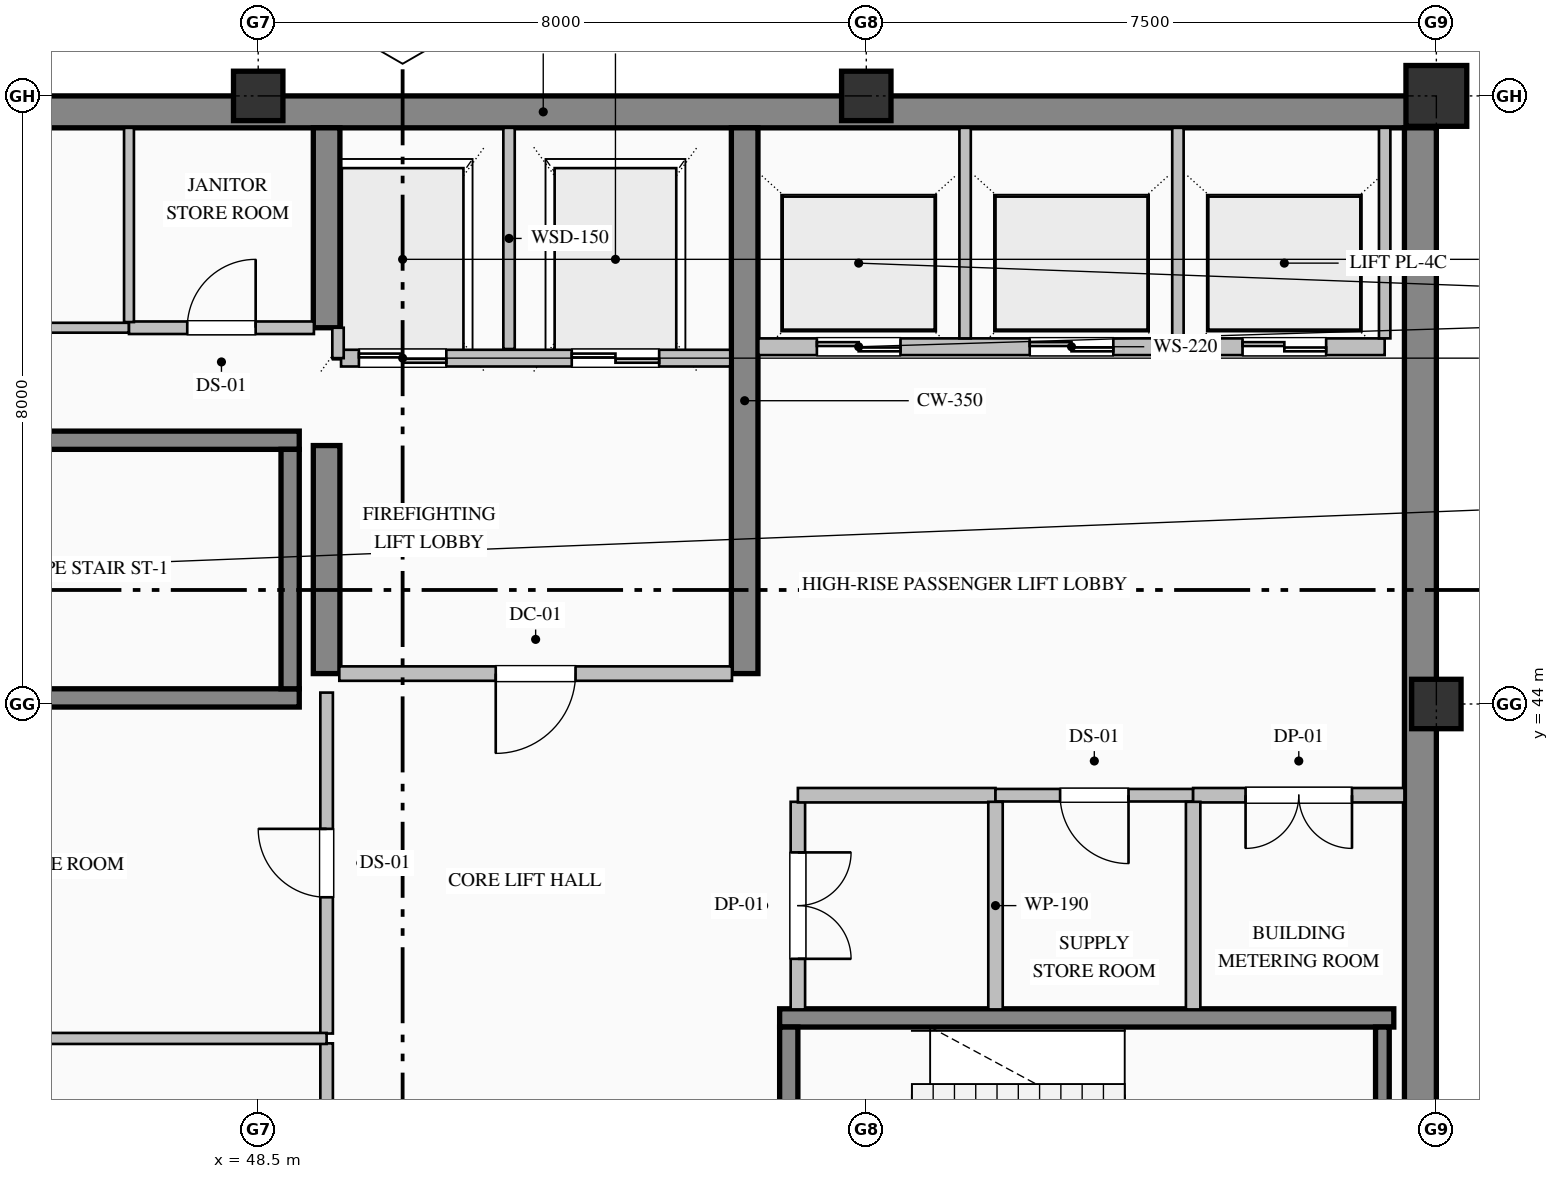
"""IFC4 building model, lengths in metres.
Left out: names, types, materials, properties, quantities, classifications, styles, units other than length and angle.
Written with IfcOpenShell. Run it as: python <this file> out.ifc"""

import sys

from ifc_helpers import new_model, si_unit, direction, frame, frame_2d, origin, origin_2d, place, context, subcontext, project, spatial, rectangle, hollow_rectangle, extrude, element, fill, save


model = new_model("IFC4")
c1 = context("Model", 3, precision=1e-05, world=origin(), true_north=direction((0.0, 1.0)))
c2 = subcontext(c1, "Body", "Model", "MODEL_VIEW")
j1 = project(units=[si_unit("LENGTHUNIT", "METRE"), si_unit("PLANEANGLEUNIT", "RADIAN")], contexts=[c1])
p1 = place(None, origin())
s1 = spatial("IfcSite", under=j1, at=p1, CompositionType="ELEMENT")
p2 = place(p1, origin())
s2 = spatial("IfcBuilding", under=s1, at=p2, CompositionType="ELEMENT")
p3 = place(p2, frame((0.0, 0.0, 355.2)))
s3 = spatial("IfcBuildingStorey", under=s2, at=p3, CompositionType="ELEMENT", Elevation=355.2)
p4 = place(p3, frame((40.5, 51.79, 0.0), z_axis=(0.0, 0.0, 1.0), x_axis=(1.0, 0.0, 0.0)))
e1 = element("IfcWall", 1, at=p4, inside=s3, PredefinedType="SHEAR", context=c2, shape_type="SweptSolid", body=[
    extrude(rectangle(XDim=23.5, YDim=0.42, at=frame_2d((11.75, 0.0))), origin(), (0.0, 0.0, 1.0), 3.785),
])
p5 = place(p3, frame((63.79, 36.32, 0.0), z_axis=(0.0, 0.0, 1.0), x_axis=(0.0, 1.0, 0.0)))
e2 = element("IfcWall", 2, at=p5, inside=s3, PredefinedType="SHEAR", context=c2, shape_type="SweptSolid", body=[
    extrude(rectangle(XDim=15.26, YDim=0.42, at=frame_2d((7.63, 0.0))), origin(), (0.0, 0.0, 1.0), 3.785),
])
p6 = place(p3, frame((49.4, 44.4, 0.0), z_axis=(0.0, 0.0, 1.0), x_axis=(0.0, 1.0, 0.0)))
e3 = element("IfcWall", 3, at=p6, inside=s3, PredefinedType="SHEAR", context=c2, shape_type="SweptSolid", body=[
    extrude(rectangle(XDim=3.0, YDim=0.35, at=frame_2d((1.5, 0.0))), origin(), (0.0, 0.0, 1.0), 3.785),
])
p7 = place(p3, frame((49.4, 48.95, 0.0), z_axis=(0.0, 0.0, 1.0), x_axis=(0.0, 1.0, 0.0)))
e4 = element("IfcWall", 4, at=p7, inside=s3, PredefinedType="SHEAR", context=c2, shape_type="SweptSolid", body=[
    extrude(rectangle(XDim=2.63, YDim=0.35, at=frame_2d((1.315, 0.0))), origin(), (0.0, 0.0, 1.0), 3.785),
])
p8 = place(p3, frame((54.9, 44.4, 0.0), z_axis=(0.0, 0.0, 1.0), x_axis=(0.0, 1.0, 0.0)))
e5 = element("IfcWall", 5, at=p8, inside=s3, PredefinedType="SHEAR", context=c2, shape_type="SweptSolid", body=[
    extrude(rectangle(XDim=7.18, YDim=0.35, at=frame_2d((3.59, 0.0))), origin(), (0.0, 0.0, 1.0), 3.785),
])
for number, where, z_axis, x_axis in (
    (6, (48.5, 52.0, 0.0), (0.0, 0.0, 1.0), (1.0, 0.0, 0.0)),
    (7, (56.5, 52.0, 0.0), (0.0, 0.0, 1.0), (1.0, 0.0, 0.0)),
    (8, (64.0, 44.0, 0.0), (0.0, 0.0, 1.0), (1.0, 0.0, 0.0)),
):
    element("IfcColumn", number, at=place(p3, frame(where, z_axis=z_axis, x_axis=x_axis)), inside=s3, PredefinedType="COLUMN", context=c2, shape_type="SweptSolid", body=[
        extrude(hollow_rectangle(XDim=0.65, YDim=0.65, WallThickness=0.028, at=origin_2d()), origin(), (0.0, 0.0, 1.0), 4.0),
    ])
p9 = place(p3, frame((64.0, 52.0, 0.0), z_axis=(0.0, 0.0, 1.0), x_axis=(1.0, 0.0, 0.0)))
e9 = element("IfcColumn", 9, at=p9, inside=s3, PredefinedType="COLUMN", context=c2, shape_type="SweptSolid", body=[
    extrude(hollow_rectangle(XDim=0.8, YDim=0.8, WallThickness=0.032, at=origin_2d()), origin(), (0.0, 0.0, 1.0), 4.0),
])
for number, where, z_axis, x_axis in (
    (10, (40.96, 47.47, 0.0), (0.0, 0.0, 1.0), (1.0, 0.0, 0.0)),
    (11, (49.04, 44.08, 0.0), (0.0, 0.0, 1.0), (-1.0, 0.0, 0.0)),
):
    element("IfcWall", number, at=place(p3, frame(where, z_axis=z_axis, x_axis=x_axis)), inside=s3, PredefinedType="SOLIDWALL", context=c2, shape_type="SweptSolid", body=[
        extrude(rectangle(XDim=8.08, YDim=0.24, at=frame_2d((4.04, 0.0))), origin(), (0.0, 0.0, 1.0), 4.0),
    ])
p10 = place(p3, frame((48.92, 44.2, 0.0), z_axis=(0.0, 0.0, 1.0), x_axis=(0.0, 1.0, 0.0)))
e12 = element("IfcWall", 12, at=p10, inside=s3, PredefinedType="SOLIDWALL", context=c2, shape_type="SweptSolid", body=[
    extrude(rectangle(XDim=3.15, YDim=0.24, at=frame_2d((1.575, 0.0))), origin(), (0.0, 0.0, 1.0), 4.0),
])
p11 = place(p3, frame((55.36, 39.87, 0.0), z_axis=(0.0, 0.0, 1.0), x_axis=(1.0, 0.0, 0.0)))
e13 = element("IfcWall", 13, at=p11, inside=s3, PredefinedType="SOLIDWALL", context=c2, shape_type="SweptSolid", body=[
    extrude(rectangle(XDim=8.08, YDim=0.24, at=frame_2d((4.04, 0.0))), origin(), (0.0, 0.0, 1.0), 4.0),
])
p12 = place(p3, frame((55.48, 39.75, 0.0), z_axis=(0.0, 0.0, 1.0), x_axis=(0.0, -1.0, 0.0)))
e14 = element("IfcWall", 14, at=p12, inside=s3, PredefinedType="SOLIDWALL", context=c2, shape_type="SweptSolid", body=[
    extrude(rectangle(XDim=3.15, YDim=0.24, at=frame_2d((1.575, 0.0))), origin(), (0.0, 0.0, 1.0), 4.0),
])
p13 = place(p12, frame((1.0, 0.0, 0.0)))
e15 = element("IfcOpeningElement", 15, at=p13, cuts=e14, PredefinedType="OPENING", context=c2, shape_type="SweptSolid", body=[
    extrude(rectangle(XDim=1.15, YDim=2.2, at=frame_2d((0.575, 1.1))), frame((0.0, 0.13, 0.0), z_axis=(0.0, -1.0, 0.0), x_axis=(1.0, 0.0, 0.0)), (0.0, 0.0, 1.0), 0.26),
])
p14 = place(p3, frame((63.29, 36.6, 0.0), z_axis=(0.0, 0.0, 1.0), x_axis=(0.0, 1.0, 0.0)))
e16 = element("IfcWall", 16, at=p14, inside=s3, PredefinedType="SOLIDWALL", context=c2, shape_type="SweptSolid", body=[
    extrude(rectangle(XDim=3.15, YDim=0.18, at=frame_2d((1.575, 0.0))), origin(), (0.0, 0.0, 1.0), 4.0),
])
p15 = place(p3, frame((54.71, 48.55, 0.0), z_axis=(0.0, 0.0, 1.0), x_axis=(-1.0, 0.0, 0.0)))
e17 = element("IfcWall", 17, at=p15, inside=s3, PredefinedType="PARTITIONING", context=c2, shape_type="SweptSolid", body=[
    extrude(rectangle(XDim=5.12, YDim=0.22, at=frame_2d((2.56, 0.0))), origin(), (0.0, 0.0, 1.0), 3.785),
])
p16 = place(p15, frame((3.735, 0.0, 0.0)))
e18 = element("IfcOpeningElement", 18, at=p16, cuts=e17, PredefinedType="OPENING", context=c2, shape_type="SweptSolid", body=[
    extrude(rectangle(XDim=1.15, YDim=2.2, at=frame_2d((0.575, 1.1))), frame((0.0, 0.12, 0.0), z_axis=(0.0, -1.0, 0.0), x_axis=(1.0, 0.0, 0.0)), (0.0, 0.0, 1.0), 0.24),
])
p17 = place(p15, frame((0.935, 0.0, 0.0)))
e19 = element("IfcOpeningElement", 19, at=p17, cuts=e17, PredefinedType="OPENING", context=c2, shape_type="SweptSolid", body=[
    extrude(rectangle(XDim=1.15, YDim=2.2, at=frame_2d((0.575, 1.1))), frame((0.0, 0.12, 0.0), z_axis=(0.0, -1.0, 0.0), x_axis=(1.0, 0.0, 0.0)), (0.0, 0.0, 1.0), 0.24),
])
p18 = place(p3, frame((51.8, 48.67, 0.0), z_axis=(0.0, 0.0, 1.0), x_axis=(0.0, 1.0, 0.0)))
e20 = element("IfcWall", 20, at=p18, inside=s3, PredefinedType="PARTITIONING", context=c2, shape_type="SweptSolid", body=[
    extrude(rectangle(XDim=2.91, YDim=0.15, at=frame_2d((1.455, 0.0))), origin(), (0.0, 0.0, 1.0), 3.785),
])
p19 = place(p3, frame((49.55, 48.55, 0.0), z_axis=(0.0, 0.0, 1.0), x_axis=(0.0, 1.0, 0.0)))
e21 = element("IfcWall", 21, at=p19, inside=s3, PredefinedType="PARTITIONING", context=c2, shape_type="SweptSolid", body=[
    extrude(rectangle(XDim=0.4, YDim=0.15, at=frame_2d((0.2, 0.0))), origin(), (0.0, 0.0, 1.0), 3.785),
])
p20 = place(p3, frame((63.32, 48.7, 0.0), z_axis=(0.0, 0.0, 1.0), x_axis=(-1.0, 0.0, 0.0)))
e22 = element("IfcWall", 22, at=p20, inside=s3, PredefinedType="PARTITIONING", context=c2, shape_type="SweptSolid", body=[
    extrude(rectangle(XDim=8.24, YDim=0.22, at=frame_2d((4.12, 0.0))), origin(), (0.0, 0.0, 1.0), 3.785),
])
p21 = place(p20, frame((6.37, 0.0, 0.0)))
e23 = element("IfcOpeningElement", 23, at=p21, cuts=e22, PredefinedType="OPENING", context=c2, shape_type="SweptSolid", body=[
    extrude(rectangle(XDim=1.1, YDim=2.2, at=frame_2d((0.55, 1.1))), frame((0.0, 0.12, 0.0), z_axis=(0.0, -1.0, 0.0), x_axis=(1.0, 0.0, 0.0)), (0.0, 0.0, 1.0), 0.24),
])
p22 = place(p20, frame((3.57, 0.0, 0.0)))
e24 = element("IfcOpeningElement", 24, at=p22, cuts=e22, PredefinedType="OPENING", context=c2, shape_type="SweptSolid", body=[
    extrude(rectangle(XDim=1.1, YDim=2.2, at=frame_2d((0.55, 1.1))), frame((0.0, 0.12, 0.0), z_axis=(0.0, -1.0, 0.0), x_axis=(1.0, 0.0, 0.0)), (0.0, 0.0, 1.0), 0.24),
])
p23 = place(p20, frame((0.77, 0.0, 0.0)))
e25 = element("IfcOpeningElement", 25, at=p23, cuts=e22, PredefinedType="OPENING", context=c2, shape_type="SweptSolid", body=[
    extrude(rectangle(XDim=1.1, YDim=2.2, at=frame_2d((0.55, 1.1))), frame((0.0, 0.12, 0.0), z_axis=(0.0, -1.0, 0.0), x_axis=(1.0, 0.0, 0.0)), (0.0, 0.0, 1.0), 0.24),
])
for number, where, z_axis, x_axis in (
    (26, (57.8, 48.81, 0.0), (0.0, 0.0, 1.0), (0.0, 1.0, 0.0)),
    (27, (60.6, 48.81, 0.0), (0.0, 0.0, 1.0), (0.0, 1.0, 0.0)),
    (28, (63.32, 48.81, 0.0), (0.0, 0.0, 1.0), (0.0, 1.0, 0.0)),
):
    element("IfcWall", number, at=place(p3, frame(where, z_axis=z_axis, x_axis=x_axis)), inside=s3, PredefinedType="PARTITIONING", context=c2, shape_type="SweptSolid", body=[
        extrude(rectangle(XDim=2.77, YDim=0.15, at=frame_2d((1.385, 0.0))), origin(), (0.0, 0.0, 1.0), 3.785),
    ])
p24 = place(p3, frame((40.92, 48.95, 0.0), z_axis=(0.0, 0.0, 1.0), x_axis=(1.0, 0.0, 0.0)))
e29 = element("IfcWall", 29, at=p24, inside=s3, PredefinedType="PARTITIONING", context=c2, shape_type="SweptSolid", body=[
    extrude(rectangle(XDim=5.88, YDim=0.13, at=frame_2d((2.94, 0.0))), origin(), (0.0, 0.0, 1.0), 3.785),
])
p25 = place(p24, frame((2.48, 0.0, 0.0)))
e30 = element("IfcOpeningElement", 30, at=p25, cuts=e29, PredefinedType="OPENING", context=c2, shape_type="SweptSolid", body=[
    extrude(rectangle(XDim=0.92, YDim=2.15, at=frame_2d((0.46, 1.075))), frame((0.0, 0.075, 0.0), z_axis=(0.0, -1.0, 0.0), x_axis=(1.0, 0.0, 0.0)), (0.0, 0.0, 1.0), 0.15),
])
p26 = place(p3, frame((46.8, 48.95, 0.0), z_axis=(0.0, 0.0, 1.0), x_axis=(1.0, 0.0, 0.0)))
e31 = element("IfcWall", 31, at=p26, inside=s3, PredefinedType="PARTITIONING", context=c2, shape_type="SweptSolid", body=[
    extrude(rectangle(XDim=2.433, YDim=0.165, at=frame_2d((1.216, 0.0))), origin(), (0.0, 0.0, 1.0), 3.785),
])
p27 = place(p26, frame((0.767, 0.0, 0.0)))
e32 = element("IfcOpeningElement", 32, at=p27, cuts=e31, PredefinedType="OPENING", context=c2, shape_type="SweptSolid", body=[
    extrude(rectangle(XDim=0.9, YDim=2.15, at=frame_2d((0.45, 1.075))), frame((0.0, 0.093, 0.0), z_axis=(0.0, -1.0, 0.0), x_axis=(1.0, 0.0, 0.0)), (0.0, 0.0, 1.0), 0.185),
])
p28 = place(p3, frame((54.733, 44.4, 0.0), z_axis=(0.0, 0.0, 1.0), x_axis=(-1.0, 0.0, 0.0)))
e33 = element("IfcWall", 33, at=p28, inside=s3, PredefinedType="PARTITIONING", context=c2, shape_type="SweptSolid", body=[
    extrude(rectangle(XDim=5.166, YDim=0.19, at=frame_2d((2.583, 0.0))), origin(), (0.0, 0.0, 1.0), 3.785),
])
p29 = place(p28, frame((2.058, 0.0, 0.0)))
e34 = element("IfcOpeningElement", 34, at=p29, cuts=e33, PredefinedType="OPENING", context=c2, shape_type="SweptSolid", body=[
    extrude(rectangle(XDim=1.05, YDim=2.15, at=frame_2d((0.525, 1.075))), frame((0.0, 0.105, 0.0), z_axis=(0.0, -1.0, 0.0), x_axis=(1.0, 0.0, 0.0)), (0.0, 0.0, 1.0), 0.21),
])
p30 = place(p3, frame((49.4, 36.42, 0.0), z_axis=(0.0, 0.0, 1.0), x_axis=(0.0, 1.0, 0.0)))
e35 = element("IfcWall", 35, at=p30, inside=s3, PredefinedType="PARTITIONING", context=c2, shape_type="SweptSolid", body=[
    extrude(rectangle(XDim=3.115, YDim=0.165, at=frame_2d((1.558, 0.0))), origin(), (0.0, 0.0, 1.0), 3.027),
])
p31 = place(p30, frame((1.058, 0.0, 0.0)))
e36 = element("IfcOpeningElement", 36, at=p31, cuts=e35, PredefinedType="OPENING", context=c2, shape_type="SweptSolid", body=[
    extrude(rectangle(XDim=1.0, YDim=2.15, at=frame_2d((0.5, 1.075))), frame((0.0, 0.093, 0.0), z_axis=(0.0, -1.0, 0.0), x_axis=(1.0, 0.0, 0.0)), (0.0, 0.0, 1.0), 0.185),
])
p32 = place(p3, frame((49.4, 39.665, 0.0), z_axis=(0.0, 0.0, 1.0), x_axis=(0.0, 1.0, 0.0)))
e37 = element("IfcWall", 37, at=p32, inside=s3, PredefinedType="PARTITIONING", context=c2, shape_type="SweptSolid", body=[
    extrude(rectangle(XDim=4.485, YDim=0.165, at=frame_2d((2.243, 0.0))), origin(), (0.0, 0.0, 1.0), 3.027),
])
p33 = place(p32, frame((1.793, 0.0, 0.0)))
e38 = element("IfcOpeningElement", 38, at=p33, cuts=e37, PredefinedType="OPENING", context=c2, shape_type="SweptSolid", body=[
    extrude(rectangle(XDim=0.9, YDim=2.15, at=frame_2d((0.45, 1.075))), frame((0.0, 0.093, 0.0), z_axis=(0.0, -1.0, 0.0), x_axis=(1.0, 0.0, 0.0)), (0.0, 0.0, 1.0), 0.185),
])
p34 = place(p3, frame((55.6, 42.713, 0.0), z_axis=(0.0, 0.0, 1.0), x_axis=(0.0, -1.0, 0.0)))
e39 = element("IfcWall", 39, at=p34, inside=s3, PredefinedType="PARTITIONING", context=c2, shape_type="SweptSolid", body=[
    extrude(rectangle(XDim=2.731, YDim=0.19, at=frame_2d((1.365, 0.0))), origin(), (0.0, 0.0, 1.0), 3.785),
])
p35 = place(p34, frame((0.666, 0.0, 0.0)))
e40 = element("IfcOpeningElement", 40, at=p35, cuts=e39, PredefinedType="OPENING", context=c2, shape_type="SweptSolid", body=[
    extrude(rectangle(XDim=1.4, YDim=2.25, at=frame_2d((0.7, 1.125))), frame((0.0, 0.105, 0.0), z_axis=(0.0, -1.0, 0.0), x_axis=(1.0, 0.0, 0.0)), (0.0, 0.0, 1.0), 0.21),
])
p36 = place(p3, frame((40.92, 39.6, 0.0), z_axis=(0.0, 0.0, 1.0), x_axis=(1.0, 0.0, 0.0)))
e41 = element("IfcWall", 41, at=p36, inside=s3, PredefinedType="PARTITIONING", context=c2, shape_type="SweptSolid", body=[
    extrude(rectangle(XDim=8.48, YDim=0.145, at=frame_2d((4.24, 0.0))), origin(), (0.0, 0.0, 1.0), 3.785),
])
p37 = place(p3, frame((58.2, 42.8, 0.0), z_axis=(0.0, 0.0, 1.0), x_axis=(-1.0, 0.0, 0.0)))
e42 = element("IfcWall", 42, at=p37, inside=s3, PredefinedType="PARTITIONING", context=c2, shape_type="SweptSolid", body=[
    extrude(rectangle(XDim=2.6, YDim=0.19, at=frame_2d((1.3, 0.0))), origin(), (0.0, 0.0, 1.0), 3.785),
])
p38 = place(p3, frame((60.8, 42.8, 0.0), z_axis=(0.0, 0.0, 1.0), x_axis=(-1.0, 0.0, 0.0)))
e43 = element("IfcWall", 43, at=p38, inside=s3, PredefinedType="PARTITIONING", context=c2, shape_type="SweptSolid", body=[
    extrude(rectangle(XDim=2.6, YDim=0.165, at=frame_2d((1.3, 0.0))), origin(), (0.0, 0.0, 1.0), 3.785),
])
p39 = place(p38, frame((0.85, 0.0, 0.0)))
e44 = element("IfcOpeningElement", 44, at=p39, cuts=e43, PredefinedType="OPENING", context=c2, shape_type="SweptSolid", body=[
    extrude(rectangle(XDim=0.9, YDim=2.15, at=frame_2d((0.45, 1.075))), frame((0.0, 0.093, 0.0), z_axis=(0.0, -1.0, 0.0), x_axis=(1.0, 0.0, 0.0)), (0.0, 0.0, 1.0), 0.185),
])
p40 = place(p3, frame((63.58, 42.8, 0.0), z_axis=(0.0, 0.0, 1.0), x_axis=(-1.0, 0.0, 0.0)))
e45 = element("IfcWall", 45, at=p40, inside=s3, PredefinedType="PARTITIONING", context=c2, shape_type="SweptSolid", body=[
    extrude(rectangle(XDim=2.78, YDim=0.19, at=frame_2d((1.39, 0.0))), origin(), (0.0, 0.0, 1.0), 3.785),
])
p41 = place(p40, frame((0.69, 0.0, 0.0)))
e46 = element("IfcOpeningElement", 46, at=p41, cuts=e45, PredefinedType="OPENING", context=c2, shape_type="SweptSolid", body=[
    extrude(rectangle(XDim=1.4, YDim=2.25, at=frame_2d((0.7, 1.125))), frame((0.0, 0.105, 0.0), z_axis=(0.0, -1.0, 0.0), x_axis=(1.0, 0.0, 0.0)), (0.0, 0.0, 1.0), 0.21),
])
p42 = place(p3, frame((46.8, 51.58, 0.0), z_axis=(0.0, 0.0, 1.0), x_axis=(0.0, -1.0, 0.0)))
e47 = element("IfcWall", 47, at=p42, inside=s3, PredefinedType="PARTITIONING", context=c2, shape_type="SweptSolid", body=[
    extrude(rectangle(XDim=2.556, YDim=0.13, at=frame_2d((1.278, 0.0))), origin(), (0.0, 0.0, 1.0), 3.785),
])
for number, where, z_axis, x_axis in (
    (48, (58.2, 42.713, 0.0), (0.0, 0.0, 1.0), (0.0, -1.0, 0.0)),
    (49, (60.8, 42.713, 0.0), (0.0, 0.0, 1.0), (0.0, -1.0, 0.0)),
):
    element("IfcWall", number, at=place(p3, frame(where, z_axis=z_axis, x_axis=x_axis)), inside=s3, PredefinedType="PARTITIONING", context=c2, shape_type="SweptSolid", body=[
        extrude(rectangle(XDim=2.731, YDim=0.19, at=frame_2d((1.365, 0.0))), origin(), (0.0, 0.0, 1.0), 3.785),
    ])
p43 = place(p16, origin())
e50 = element("IfcDoor", 50, at=p43, inside=s3, OperationType="DOUBLE_DOOR_SLIDING", PredefinedType="DOOR", context=c2, shape_type="SweptSolid", body=[
    extrude(rectangle(XDim=1.15, YDim=2.2, at=frame_2d((0.575, 1.1))), frame((0.0, 0.025, 0.0), z_axis=(0.0, -1.0, 0.0), x_axis=(1.0, 0.0, 0.0)), (0.0, 0.0, 1.0), 0.05),
])
fill(e18, e50)
p44 = place(p17, origin())
e51 = element("IfcDoor", 51, at=p44, inside=s3, OperationType="DOUBLE_DOOR_SLIDING", PredefinedType="DOOR", context=c2, shape_type="SweptSolid", body=[
    extrude(rectangle(XDim=1.15, YDim=2.2, at=frame_2d((0.575, 1.1))), frame((0.0, 0.025, 0.0), z_axis=(0.0, -1.0, 0.0), x_axis=(1.0, 0.0, 0.0)), (0.0, 0.0, 1.0), 0.05),
])
fill(e19, e51)
p45 = place(p21, origin())
e52 = element("IfcDoor", 52, at=p45, inside=s3, OperationType="DOUBLE_DOOR_SLIDING", PredefinedType="DOOR", context=c2, shape_type="SweptSolid", body=[
    extrude(rectangle(XDim=1.1, YDim=2.2, at=frame_2d((0.55, 1.1))), frame((0.0, 0.025, 0.0), z_axis=(0.0, -1.0, 0.0), x_axis=(1.0, 0.0, 0.0)), (0.0, 0.0, 1.0), 0.05),
])
fill(e23, e52)
p46 = place(p22, origin())
e53 = element("IfcDoor", 53, at=p46, inside=s3, OperationType="DOUBLE_DOOR_SLIDING", PredefinedType="DOOR", context=c2, shape_type="SweptSolid", body=[
    extrude(rectangle(XDim=1.1, YDim=2.2, at=frame_2d((0.55, 1.1))), frame((0.0, 0.025, 0.0), z_axis=(0.0, -1.0, 0.0), x_axis=(1.0, 0.0, 0.0)), (0.0, 0.0, 1.0), 0.05),
])
fill(e24, e53)
p47 = place(p23, origin())
e54 = element("IfcDoor", 54, at=p47, inside=s3, OperationType="DOUBLE_DOOR_SLIDING", PredefinedType="DOOR", context=c2, shape_type="SweptSolid", body=[
    extrude(rectangle(XDim=1.1, YDim=2.2, at=frame_2d((0.55, 1.1))), frame((0.0, 0.025, 0.0), z_axis=(0.0, -1.0, 0.0), x_axis=(1.0, 0.0, 0.0)), (0.0, 0.0, 1.0), 0.05),
])
fill(e25, e54)
p48 = place(p29, origin())
e55 = element("IfcDoor", 55, at=p48, inside=s3, OperationType="SINGLE_SWING_RIGHT", PredefinedType="DOOR", context=c2, shape_type="SweptSolid", body=[
    extrude(rectangle(XDim=1.05, YDim=2.15, at=frame_2d((0.525, 1.075))), frame((0.0, 0.025, 0.0), z_axis=(0.0, -1.0, 0.0), x_axis=(1.0, 0.0, 0.0)), (0.0, 0.0, 1.0), 0.05),
])
fill(e34, e55)
p49 = place(p33, origin())
e56 = element("IfcDoor", 56, at=p49, inside=s3, OperationType="SINGLE_SWING_RIGHT", PredefinedType="DOOR", context=c2, shape_type="SweptSolid", body=[
    extrude(rectangle(XDim=0.9, YDim=2.15, at=frame_2d((0.45, 1.075))), frame((0.0, 0.025, 0.0), z_axis=(0.0, -1.0, 0.0), x_axis=(1.0, 0.0, 0.0)), (0.0, 0.0, 1.0), 0.05),
])
fill(e38, e56)
p50 = place(p27, origin())
e57 = element("IfcDoor", 57, at=p50, inside=s3, OperationType="SINGLE_SWING_RIGHT", PredefinedType="DOOR", context=c2, shape_type="SweptSolid", body=[
    extrude(rectangle(XDim=0.9, YDim=2.15, at=frame_2d((0.45, 1.075))), frame((0.0, 0.025, 0.0), z_axis=(0.0, -1.0, 0.0), x_axis=(1.0, 0.0, 0.0)), (0.0, 0.0, 1.0), 0.05),
])
fill(e32, e57)
p51 = place(p35, origin())
e58 = element("IfcDoor", 58, at=p51, inside=s3, OperationType="DOUBLE_DOOR_SINGLE_SWING", PredefinedType="DOOR", context=c2, shape_type="SweptSolid", body=[
    extrude(rectangle(XDim=1.4, YDim=2.25, at=frame_2d((0.7, 1.125))), frame((0.0, 0.025, 0.0), z_axis=(0.0, -1.0, 0.0), x_axis=(1.0, 0.0, 0.0)), (0.0, 0.0, 1.0), 0.05),
])
fill(e40, e58)
p52 = place(p39, origin())
e59 = element("IfcDoor", 59, at=p52, inside=s3, OperationType="SINGLE_SWING_LEFT", PredefinedType="DOOR", context=c2, shape_type="SweptSolid", body=[
    extrude(rectangle(XDim=0.9, YDim=2.15, at=frame_2d((0.45, 1.075))), frame((0.0, 0.025, 0.0), z_axis=(0.0, -1.0, 0.0), x_axis=(1.0, 0.0, 0.0)), (0.0, 0.0, 1.0), 0.05),
])
fill(e44, e59)
p53 = place(p41, origin())
e60 = element("IfcDoor", 60, at=p53, inside=s3, OperationType="DOUBLE_DOOR_SINGLE_SWING", PredefinedType="DOOR", context=c2, shape_type="SweptSolid", body=[
    extrude(rectangle(XDim=1.4, YDim=2.25, at=frame_2d((0.7, 1.125))), frame((0.0, 0.025, 0.0), z_axis=(0.0, -1.0, 0.0), x_axis=(1.0, 0.0, 0.0)), (0.0, 0.0, 1.0), 0.05),
])
fill(e46, e60)
save(model, sys.argv[1])
